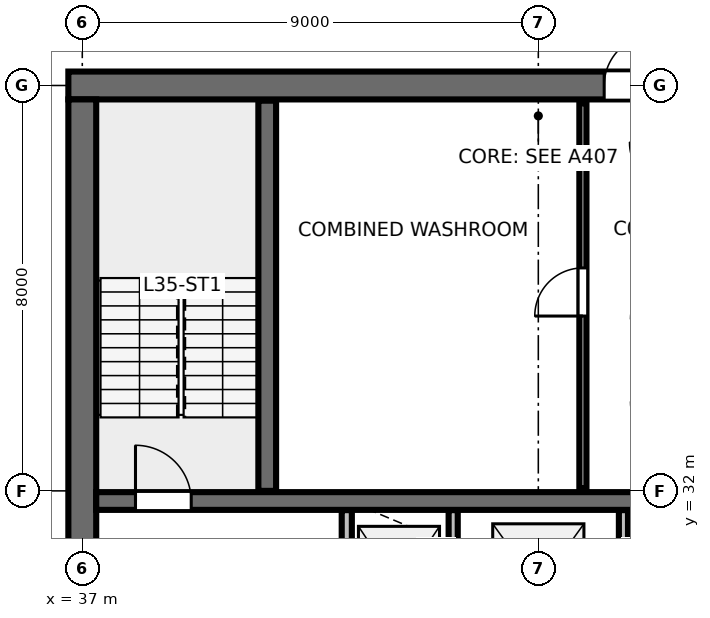
"""IFC4 building model, lengths in metres.
Left out: names, types, materials, properties, quantities, classifications, styles, units other than length and angle.
Written with IfcOpenShell. Run it as: python <this file> out.ifc"""

import sys

from ifc_helpers import new_model, si_unit, direction, frame, frame_2d, origin, place, context, subcontext, project, spatial, rectangle, extrude, element, fill, save


model = new_model("IFC4")
c1 = context("Model", 3, precision=1e-05, world=origin(), true_north=direction((0.0, 1.0)))
c2 = subcontext(c1, "Body", "Model", "MODEL_VIEW")
j1 = project(units=[si_unit("LENGTHUNIT", "METRE"), si_unit("PLANEANGLEUNIT", "RADIAN")], contexts=[c1])
p1 = place(None, origin())
s1 = spatial("IfcSite", under=j1, at=p1, CompositionType="ELEMENT")
p2 = place(p1, origin())
s2 = spatial("IfcBuilding", under=s1, at=p2, CompositionType="ELEMENT")
p3 = place(p2, frame((0.0, 0.0, 134.8)))
s3 = spatial("IfcBuildingStorey", under=s2, at=p3, CompositionType="ELEMENT", Elevation=134.8)
p4 = place(p3, frame((36.725, 40.0, 0.0), z_axis=(0.0, 0.0, 1.0), x_axis=(1.0, 0.0, 0.0)))
e1 = element("IfcWall", 1, at=p4, inside=s3, PredefinedType="SHEAR", context=c2, shape_type="SweptSolid", body=[
    extrude(rectangle(XDim=18.55, YDim=0.55, at=frame_2d((9.275, 0.0))), origin(), (0.0, 0.0, 1.0), 3.36),
])
p5 = place(p4, frame((10.575, 0.0, 0.0)))
e2 = element("IfcOpeningElement", 2, at=p5, cuts=e1, PredefinedType="OPENING", context=c2, shape_type="SweptSolid", body=[
    extrude(rectangle(XDim=1.0, YDim=2.15, at=frame_2d((0.5, 1.075))), frame((0.0, 0.285, 0.0), z_axis=(0.0, -1.0, 0.0), x_axis=(1.0, 0.0, 0.0)), (0.0, 0.0, 1.0), 0.57),
])
p6 = place(p3, frame((37.0, 24.275, 0.0), z_axis=(0.0, 0.0, 1.0), x_axis=(0.0, 1.0, 0.0)))
e3 = element("IfcWall", 3, at=p6, inside=s3, PredefinedType="SHEAR", context=c2, shape_type="SweptSolid", body=[
    extrude(rectangle(XDim=15.45, YDim=0.55, at=frame_2d((7.725, 0.0))), origin(), (0.0, 0.0, 1.0), 3.36),
])
p7 = place(p6, frame((5.25, 0.0, 0.0)))
e4 = element("IfcOpeningElement", 4, at=p7, cuts=e3, PredefinedType="OPENING", context=c2, shape_type="SweptSolid", body=[
    extrude(rectangle(XDim=1.15, YDim=2.15, at=frame_2d((0.575, 1.075))), frame((0.0, 0.285, 0.0), z_axis=(0.0, -1.0, 0.0), x_axis=(1.0, 0.0, 0.0)), (0.0, 0.0, 1.0), 0.57),
])
p8 = place(p3, frame((37.275, 31.8, 0.0), z_axis=(0.0, 0.0, 1.0), x_axis=(1.0, 0.0, 0.0)))
e5 = element("IfcWall", 5, at=p8, inside=s3, PredefinedType="SHEAR", context=c2, shape_type="SweptSolid", body=[
    extrude(rectangle(XDim=17.45, YDim=0.35, at=frame_2d((8.725, 0.0))), origin(), (0.0, 0.0, 1.0), 3.36),
])
p9 = place(p8, frame((0.775, 0.0, 0.0)))
e6 = element("IfcOpeningElement", 6, at=p9, cuts=e5, PredefinedType="OPENING", context=c2, shape_type="SweptSolid", body=[
    extrude(rectangle(XDim=1.1, YDim=2.15, at=frame_2d((0.55, 1.075))), frame((0.0, 0.185, 0.0), z_axis=(0.0, -1.0, 0.0), x_axis=(1.0, 0.0, 0.0)), (0.0, 0.0, 1.0), 0.37),
])
p10 = place(p8, frame((14.675, 0.0, 0.0)))
e7 = element("IfcOpeningElement", 7, at=p10, cuts=e5, PredefinedType="OPENING", context=c2, shape_type="SweptSolid", body=[
    extrude(rectangle(XDim=1.1, YDim=2.15, at=frame_2d((0.55, 1.075))), frame((0.0, 0.185, 0.0), z_axis=(0.0, -1.0, 0.0), x_axis=(1.0, 0.0, 0.0)), (0.0, 0.0, 1.0), 0.37),
])
p11 = place(p3, frame((40.65, 32.0, 0.0), z_axis=(0.0, 0.0, 1.0), x_axis=(0.0, 1.0, 0.0)))
e8 = element("IfcWall", 8, at=p11, inside=s3, PredefinedType="SHEAR", context=c2, shape_type="SweptSolid", body=[
    extrude(rectangle(XDim=7.7, YDim=0.35, at=frame_2d((3.85, 0.0))), origin(), (0.0, 0.0, 1.0), 3.6),
])
p12 = place(p3, frame((46.88, 32.05, 0.0), z_axis=(0.0, 0.0, 1.0), x_axis=(0.0, 1.0, 0.0)))
e9 = element("IfcWall", 9, at=p12, inside=s3, PredefinedType="PARTITIONING", context=c2, shape_type="SweptSolid", body=[
    extrude(rectangle(XDim=7.6, YDim=0.14, at=frame_2d((3.8, 0.0))), origin(), (0.0, 0.0, 1.0), 3.36),
])
p13 = place(p12, frame((3.4, 0.0, 0.0)))
e10 = element("IfcOpeningElement", 10, at=p13, cuts=e9, PredefinedType="OPENING", context=c2, shape_type="SweptSolid", body=[
    extrude(rectangle(XDim=0.95, YDim=2.15, at=frame_2d((0.475, 1.075))), frame((0.0, 0.08, 0.0), z_axis=(0.0, -1.0, 0.0), x_axis=(1.0, 0.0, 0.0)), (0.0, 0.0, 1.0), 0.16),
])
p14 = place(p3, frame((42.22, 28.58, 0.0), z_axis=(0.0, 0.0, 1.0), x_axis=(0.0, 1.0, 0.0)))
e11 = element("IfcWall", 11, at=p14, inside=s3, PredefinedType="PARTITIONING", context=c2, shape_type="SweptSolid", body=[
    extrude(rectangle(XDim=3.04, YDim=0.2, at=frame_2d((1.52, 0.0))), origin(), (0.0, 0.0, 1.0), 3.36),
])
p15 = place(p14, frame((0.95, 0.0, 0.0)))
e12 = element("IfcOpeningElement", 12, at=p15, cuts=e11, PredefinedType="OPENING", context=c2, shape_type="SweptSolid", body=[
    extrude(rectangle(XDim=1.05, YDim=2.15, at=frame_2d((0.525, 1.075))), frame((0.0, 0.11, 0.0), z_axis=(0.0, -1.0, 0.0), x_axis=(1.0, 0.0, 0.0)), (0.0, 0.0, 1.0), 0.22),
])
for number, where, z_axis, x_axis in (
    (13, (44.32, 28.58, 0.0), (0.0, 0.0, 1.0), (0.0, 1.0, 0.0)),
    (14, (47.68, 28.58, 0.0), (0.0, 0.0, 1.0), (0.0, 1.0, 0.0)),
):
    element("IfcWall", number, at=place(p3, frame(where, z_axis=z_axis, x_axis=x_axis)), inside=s3, PredefinedType="PARTITIONING", context=c2, shape_type="SweptSolid", body=[
        extrude(rectangle(XDim=3.04, YDim=0.18, at=frame_2d((1.52, 0.0))), origin(), (0.0, 0.0, 1.0), 3.36),
    ])
p16 = place(p9, origin())
e15 = element("IfcDoor", 15, at=p16, inside=s3, OperationType="SINGLE_SWING_LEFT", PredefinedType="DOOR", context=c2, shape_type="SweptSolid", body=[
    extrude(rectangle(XDim=1.1, YDim=2.15, at=frame_2d((0.55, 1.075))), frame((0.0, 0.025, 0.0), z_axis=(0.0, -1.0, 0.0), x_axis=(1.0, 0.0, 0.0)), (0.0, 0.0, 1.0), 0.05),
])
fill(e6, e15)
p17 = place(p5, origin())
e16 = element("IfcDoor", 16, at=p17, inside=s3, OperationType="SINGLE_SWING_RIGHT", PredefinedType="DOOR", context=c2, shape_type="SweptSolid", body=[
    extrude(rectangle(XDim=1.0, YDim=2.15, at=frame_2d((0.5, 1.075))), frame((0.0, 0.025, 0.0), z_axis=(0.0, -1.0, 0.0), x_axis=(1.0, 0.0, 0.0)), (0.0, 0.0, 1.0), 0.05),
])
fill(e2, e16)
p18 = place(p13, origin())
e17 = element("IfcDoor", 17, at=p18, inside=s3, OperationType="SINGLE_SWING_LEFT", PredefinedType="DOOR", context=c2, shape_type="SweptSolid", body=[
    extrude(rectangle(XDim=0.95, YDim=2.15, at=frame_2d((0.475, 1.075))), frame((0.0, 0.025, 0.0), z_axis=(0.0, -1.0, 0.0), x_axis=(1.0, 0.0, 0.0)), (0.0, 0.0, 1.0), 0.05),
])
fill(e10, e17)
save(model, sys.argv[1])
